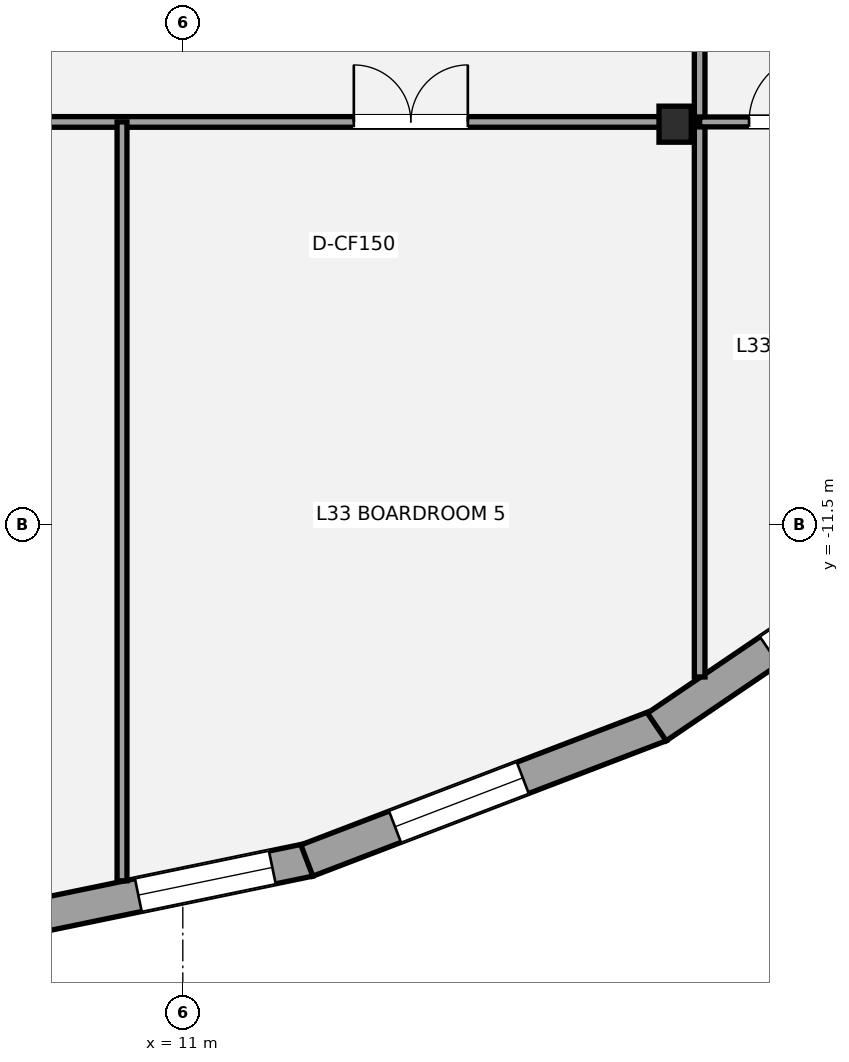
"""IFC4 building model, lengths in metres.
Left out: names, types, materials, properties, quantities, classifications, styles, units other than length and angle.
Written with IfcOpenShell. Run it as: python <this file> out.ifc"""

import sys

from ifc_helpers import new_model, si_unit, direction, frame, frame_2d, origin, origin_2d, place, context, subcontext, project, spatial, rectangle, i_section, extrude, element, fill, save


model = new_model("IFC4")
c1 = context("Model", 3, precision=1e-05, world=origin(), true_north=direction((0.0, 1.0)))
c2 = subcontext(c1, "Body", "Model", "MODEL_VIEW")
j1 = project(units=[si_unit("LENGTHUNIT", "METRE"), si_unit("PLANEANGLEUNIT", "RADIAN")], contexts=[c1])
p1 = place(None, origin())
s1 = spatial("IfcSite", under=j1, at=p1, CompositionType="ELEMENT")
p2 = place(p1, origin())
s2 = spatial("IfcBuilding", under=s1, at=p2, CompositionType="ELEMENT")
p3 = place(p2, frame((0.0, 0.0, 124.6)))
s3 = spatial("IfcBuildingStorey", under=s2, at=p3, CompositionType="ELEMENT", Elevation=124.6)
p4 = place(p3, frame((17.477, -6.229, 0.0), z_axis=(0.0, 0.0, 1.0), x_axis=(1.0, 0.0, 0.0)))
e1 = element("IfcColumn", 1, at=p4, inside=s3, PredefinedType="COLUMN", context=c2, shape_type="SweptSolid", body=[
    extrude(i_section(OverallWidth=0.424, OverallDepth=0.474, WebThickness=0.048, FlangeThickness=0.077, at=origin_2d()), origin(), (0.0, 0.0, 1.0), 3.5),
])
p5 = place(p3, frame((12.666, -15.907, 0.0), z_axis=(0.0, 0.0, 1.0), x_axis=(-0.979339014215, -0.202225357552, 0.0)))
e2 = element("IfcWall", 2, at=p5, inside=s3, PredefinedType="STANDARD", context=c2, shape_type="SweptSolid", body=[
    extrude(rectangle(XDim=5.138, YDim=0.44, at=frame_2d((2.569, 0.0))), origin(), (0.0, 0.0, 1.0), 2.528),
])
p6 = place(p5, frame((0.499, 0.0, 0.65)))
e3 = element("IfcOpeningElement", 3, at=p6, cuts=e2, PredefinedType="OPENING", context=c2, shape_type="SweptSolid", body=[
    extrude(rectangle(XDim=1.8, YDim=1.7, at=frame_2d((0.9, 0.85))), frame((0.0, 0.23, 0.0), z_axis=(0.0, -1.0, 0.0), x_axis=(1.0, 0.0, 0.0)), (0.0, 0.0, 1.0), 0.46),
])
p7 = place(p3, frame((17.281, -14.136, 0.0), z_axis=(0.0, 0.0, 1.0), x_axis=(-0.933853964101, -0.357654545243, 0.0)))
e4 = element("IfcWall", 4, at=p7, inside=s3, PredefinedType="STANDARD", context=c2, shape_type="SweptSolid", body=[
    extrude(rectangle(XDim=4.979, YDim=0.44, at=frame_2d((2.49, 0.0))), origin(), (0.0, 0.0, 1.0), 2.528),
])
p8 = place(p7, frame((1.937, 0.0, 0.65)))
e5 = element("IfcOpeningElement", 5, at=p8, cuts=e4, PredefinedType="OPENING", context=c2, shape_type="SweptSolid", body=[
    extrude(rectangle(XDim=1.8, YDim=1.7, at=frame_2d((0.9, 0.85))), frame((0.0, 0.23, 0.0), z_axis=(0.0, -1.0, 0.0), x_axis=(1.0, 0.0, 0.0)), (0.0, 0.0, 1.0), 0.46),
])
p9 = place(p3, frame((21.03, -11.588, 0.0), z_axis=(0.0, 0.0, 1.0), x_axis=(-0.827672849676, -0.561210881852, 0.0)))
e6 = element("IfcWall", 6, at=p9, inside=s3, PredefinedType="STANDARD", context=c2, shape_type="SweptSolid", body=[
    extrude(rectangle(XDim=4.583, YDim=0.44, at=frame_2d((2.292, 0.0))), origin(), (0.0, 0.0, 1.0), 2.528),
])
p10 = place(p9, frame((0.994, 0.0, 0.65)))
e7 = element("IfcOpeningElement", 7, at=p10, cuts=e6, PredefinedType="OPENING", context=c2, shape_type="SweptSolid", body=[
    extrude(rectangle(XDim=1.8, YDim=1.7, at=frame_2d((0.9, 0.85))), frame((0.0, 0.23, 0.0), z_axis=(0.0, -1.0, 0.0), x_axis=(1.0, 0.0, 0.0)), (0.0, 0.0, 1.0), 0.46),
])
p11 = place(p3, frame((-16.2, -6.2, 0.0), z_axis=(0.0, 0.0, 1.0), x_axis=(1.0, 0.0, 0.0)))
e8 = element("IfcWall", 8, at=p11, inside=s3, PredefinedType="PARTITIONING", context=c2, shape_type="SweptSolid", body=[
    extrude(rectangle(XDim=34.0, YDim=0.14, at=frame_2d((17.0, 0.0))), origin(), (0.0, 0.0, 1.0), 2.688),
])
p12 = place(p11, frame((2.75, 0.0, 0.0)))
e9 = element("IfcOpeningElement", 9, at=p12, cuts=e8, PredefinedType="OPENING", context=c2, shape_type="SweptSolid", body=[
    extrude(rectangle(XDim=0.9, YDim=2.1, at=frame_2d((0.45, 1.05))), frame((0.0, 0.08, 0.0), z_axis=(0.0, -1.0, 0.0), x_axis=(1.0, 0.0, 0.0)), (0.0, 0.0, 1.0), 0.16),
])
p13 = place(p11, frame((9.45, 0.0, 0.0)))
e10 = element("IfcOpeningElement", 10, at=p13, cuts=e8, PredefinedType="OPENING", context=c2, shape_type="SweptSolid", body=[
    extrude(rectangle(XDim=0.9, YDim=2.1, at=frame_2d((0.45, 1.05))), frame((0.0, 0.08, 0.0), z_axis=(0.0, -1.0, 0.0), x_axis=(1.0, 0.0, 0.0)), (0.0, 0.0, 1.0), 0.16),
])
p14 = place(p11, frame((16.45, 0.0, 0.0)))
e11 = element("IfcOpeningElement", 11, at=p14, cuts=e8, PredefinedType="OPENING", context=c2, shape_type="SweptSolid", body=[
    extrude(rectangle(XDim=0.9, YDim=2.1, at=frame_2d((0.45, 1.05))), frame((0.0, 0.08, 0.0), z_axis=(0.0, -1.0, 0.0), x_axis=(1.0, 0.0, 0.0)), (0.0, 0.0, 1.0), 0.16),
])
p15 = place(p11, frame((22.95, 0.0, 0.0)))
e12 = element("IfcOpeningElement", 12, at=p15, cuts=e8, PredefinedType="OPENING", context=c2, shape_type="SweptSolid", body=[
    extrude(rectangle(XDim=0.9, YDim=2.1, at=frame_2d((0.45, 1.05))), frame((0.0, 0.08, 0.0), z_axis=(0.0, -1.0, 0.0), x_axis=(1.0, 0.0, 0.0)), (0.0, 0.0, 1.0), 0.16),
])
p16 = place(p11, frame((29.45, 0.0, 0.0)))
e13 = element("IfcOpeningElement", 13, at=p16, cuts=e8, PredefinedType="OPENING", context=c2, shape_type="SweptSolid", body=[
    extrude(rectangle(XDim=1.5, YDim=2.15, at=frame_2d((0.75, 1.075))), frame((0.0, 0.08, 0.0), z_axis=(0.0, -1.0, 0.0), x_axis=(1.0, 0.0, 0.0)), (0.0, 0.0, 1.0), 0.16),
])
p17 = place(p3, frame((17.8, -13.502, 0.0), z_axis=(0.0, 0.0, 1.0), x_axis=(0.0, 1.0, 0.0)))
e14 = element("IfcWall", 14, at=p17, inside=s3, PredefinedType="PARTITIONING", context=c2, shape_type="SweptSolid", body=[
    extrude(rectangle(XDim=21.052, YDim=0.14, at=frame_2d((10.526, 0.0))), origin(), (0.0, 0.0, 1.0), 2.688),
])
p18 = place(p17, frame((11.153, 0.0, 0.0)))
e15 = element("IfcOpeningElement", 15, at=p18, cuts=e14, PredefinedType="OPENING", context=c2, shape_type="SweptSolid", body=[
    extrude(rectangle(XDim=0.9, YDim=2.1, at=frame_2d((0.45, 1.05))), frame((0.0, 0.08, 0.0), z_axis=(0.0, -1.0, 0.0), x_axis=(1.0, 0.0, 0.0)), (0.0, 0.0, 1.0), 0.16),
])
p19 = place(p17, frame((18.028, 0.0, 0.0)))
e16 = element("IfcOpeningElement", 16, at=p19, cuts=e14, PredefinedType="OPENING", context=c2, shape_type="SweptSolid", body=[
    extrude(rectangle(XDim=0.9, YDim=2.1, at=frame_2d((0.45, 1.05))), frame((0.0, 0.08, 0.0), z_axis=(0.0, -1.0, 0.0), x_axis=(1.0, 0.0, 0.0)), (0.0, 0.0, 1.0), 0.16),
])
p20 = place(p3, frame((10.2, -16.184, 0.0), z_axis=(0.0, 0.0, 1.0), x_axis=(0.0, 1.0, 0.0)))
e17 = element("IfcWall", 17, at=p20, inside=s3, PredefinedType="PARTITIONING", context=c2, shape_type="SweptSolid", body=[
    extrude(rectangle(XDim=9.984, YDim=0.13, at=frame_2d((4.992, 0.0))), origin(), (0.0, 0.0, 1.0), 3.31),
])
p21 = place(p3, frame((17.8, -6.2, 0.0), z_axis=(0.0, 0.0, 1.0), x_axis=(1.0, 0.0, 0.0)))
e18 = element("IfcWall", 18, at=p21, inside=s3, PredefinedType="PARTITIONING", context=c2, shape_type="SweptSolid", body=[
    extrude(rectangle(XDim=6.575, YDim=0.13, at=frame_2d((3.288, 0.0))), origin(), (0.0, 0.0, 1.0), 2.763),
])
p22 = place(p21, frame((0.65, 0.0, 0.0)))
e19 = element("IfcOpeningElement", 19, at=p22, cuts=e18, PredefinedType="OPENING", context=c2, shape_type="SweptSolid", body=[
    extrude(rectangle(XDim=0.9, YDim=2.1, at=frame_2d((0.45, 1.05))), frame((0.0, 0.075, 0.0), z_axis=(0.0, -1.0, 0.0), x_axis=(1.0, 0.0, 0.0)), (0.0, 0.0, 1.0), 0.15),
])
p23 = place(p6, origin())
e20 = element("IfcWindow", 20, at=p23, inside=s3, PartitioningType="SINGLE_PANEL", PredefinedType="WINDOW", context=c2, shape_type="SweptSolid", body=[
    extrude(rectangle(XDim=1.8, YDim=1.7, at=frame_2d((0.9, 0.85))), frame((0.0, -0.01, 0.0), z_axis=(0.0, -1.0, 0.0), x_axis=(1.0, 0.0, 0.0)), (0.0, 0.0, 1.0), 0.06),
])
fill(e3, e20)
p24 = place(p8, origin())
e21 = element("IfcWindow", 21, at=p24, inside=s3, PartitioningType="SINGLE_PANEL", PredefinedType="WINDOW", context=c2, shape_type="SweptSolid", body=[
    extrude(rectangle(XDim=1.8, YDim=1.7, at=frame_2d((0.9, 0.85))), frame((0.0, -0.01, 0.0), z_axis=(0.0, -1.0, 0.0), x_axis=(1.0, 0.0, 0.0)), (0.0, 0.0, 1.0), 0.06),
])
fill(e5, e21)
p25 = place(p10, origin())
e22 = element("IfcWindow", 22, at=p25, inside=s3, PartitioningType="SINGLE_PANEL", PredefinedType="WINDOW", context=c2, shape_type="SweptSolid", body=[
    extrude(rectangle(XDim=1.8, YDim=1.7, at=frame_2d((0.9, 0.85))), frame((0.0, -0.01, 0.0), z_axis=(0.0, -1.0, 0.0), x_axis=(1.0, 0.0, 0.0)), (0.0, 0.0, 1.0), 0.06),
])
fill(e7, e22)
p26 = place(p16, origin())
e23 = element("IfcDoor", 23, at=p26, inside=s3, OperationType="DOUBLE_DOOR_SINGLE_SWING", PredefinedType="DOOR", context=c2, shape_type="SweptSolid", body=[
    extrude(rectangle(XDim=1.5, YDim=2.15, at=frame_2d((0.75, 1.075))), frame((0.0, 0.025, 0.0), z_axis=(0.0, -1.0, 0.0), x_axis=(1.0, 0.0, 0.0)), (0.0, 0.0, 1.0), 0.05),
])
fill(e13, e23)
p27 = place(p22, origin())
e24 = element("IfcDoor", 24, at=p27, inside=s3, OperationType="SINGLE_SWING_RIGHT", PredefinedType="DOOR", context=c2, shape_type="SweptSolid", body=[
    extrude(rectangle(XDim=0.9, YDim=2.1, at=frame_2d((0.45, 1.05))), frame((0.0, 0.025, 0.0), z_axis=(0.0, -1.0, 0.0), x_axis=(1.0, 0.0, 0.0)), (0.0, 0.0, 1.0), 0.05),
])
fill(e19, e24)
save(model, sys.argv[1])
